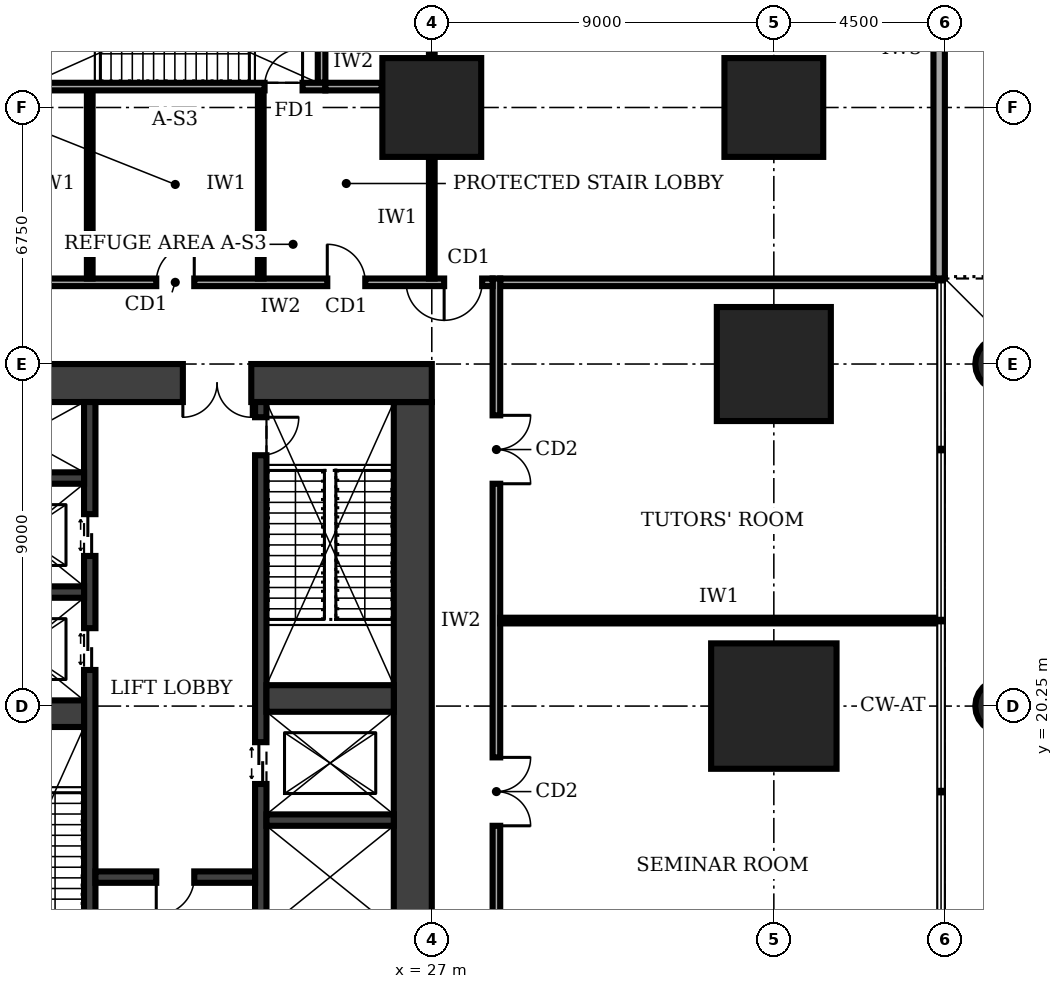
"""IFC4 building model, lengths in metres.
Left out: names, types, materials, properties, quantities, classifications, styles, units other than length and angle.
Written with IfcOpenShell. Run it as: python <this file> out.ifc"""

import sys

from ifc_helpers import new_model, si_unit, direction, frame, frame_2d, origin, origin_2d, place, context, subcontext, project, spatial, rectangle, circle, extrude, element, fill, save


model = new_model("IFC4")
c1 = context("Model", 3, precision=1e-05, world=origin(), true_north=direction((0.0, 1.0)))
c2 = subcontext(c1, "Body", "Model", "MODEL_VIEW")
j1 = project(units=[si_unit("LENGTHUNIT", "METRE"), si_unit("PLANEANGLEUNIT", "RADIAN")], contexts=[c1])
p1 = place(None, origin())
s1 = spatial("IfcSite", under=j1, at=p1, CompositionType="ELEMENT")
p2 = place(p1, origin())
s2 = spatial("IfcBuilding", under=s1, at=p2, CompositionType="ELEMENT")
p3 = place(p2, frame((0.0, 0.0, 6.0)))
s3 = spatial("IfcBuildingStorey", under=s2, at=p3, CompositionType="ELEMENT", Elevation=6.0)
p4 = place(p3, frame((26.5, 12.25, 0.0), z_axis=(0.0, 0.0, 1.0), x_axis=(0.0, 1.0, 0.0)))
e1 = element("IfcWall", 1, at=p4, inside=s3, PredefinedType="SHEAR", context=c2, shape_type="SweptSolid", body=[
    extrude(rectangle(XDim=16.0, YDim=1.0, at=frame_2d((8.0, 0.0))), origin(), (0.0, 0.0, 1.0), 5.0),
])
p5 = place(p3, frame((27.0, 28.75, 0.0), z_axis=(0.0, 0.0, 1.0), x_axis=(-1.0, 0.0, 0.0)))
e2 = element("IfcWall", 2, at=p5, inside=s3, PredefinedType="SHEAR", context=c2, shape_type="SweptSolid", body=[
    extrude(rectangle(XDim=13.5, YDim=1.0, at=frame_2d((6.75, 0.0))), origin(), (0.0, 0.0, 1.0), 5.0),
])
p6 = place(p5, frame((4.75, 0.0, 0.0)))
e3 = element("IfcOpeningElement", 3, at=p6, cuts=e2, PredefinedType="OPENING", context=c2, shape_type="SweptSolid", body=[
    extrude(rectangle(XDim=1.8, YDim=2.1, at=frame_2d((0.9, 1.05))), frame((0.0, 0.51, 0.0), z_axis=(0.0, -1.0, 0.0), x_axis=(1.0, 0.0, 0.0)), (0.0, 0.0, 1.0), 1.02),
])
p7 = place(p3, frame((18.0, 12.25, 0.0), z_axis=(0.0, 0.0, 1.0), x_axis=(0.0, 1.0, 0.0)))
e4 = element("IfcWall", 4, at=p7, inside=s3, PredefinedType="SHEAR", context=c2, shape_type="SweptSolid", body=[
    extrude(rectangle(XDim=16.0, YDim=0.3, at=frame_2d((8.0, 0.0))), origin(), (0.0, 0.0, 1.0), 5.0),
])
p8 = place(p7, frame((0.4, 0.0, 0.0)))
e5 = element("IfcOpeningElement", 5, at=p8, cuts=e4, PredefinedType="OPENING", context=c2, shape_type="SweptSolid", body=[
    extrude(rectangle(XDim=1.0, YDim=2.1, at=frame_2d((0.5, 1.05))), frame((0.0, 0.16, 0.0), z_axis=(0.0, -1.0, 0.0), x_axis=(1.0, 0.0, 0.0)), (0.0, 0.0, 1.0), 0.32),
])
p9 = place(p7, frame((8.95, 0.0, 0.0)))
e6 = element("IfcOpeningElement", 6, at=p9, cuts=e4, PredefinedType="OPENING", context=c2, shape_type="SweptSolid", body=[
    extrude(rectangle(XDim=1.1, YDim=2.1, at=frame_2d((0.55, 1.05))), frame((0.0, 0.16, 0.0), z_axis=(0.0, -1.0, 0.0), x_axis=(1.0, 0.0, 0.0)), (0.0, 0.0, 1.0), 0.32),
])
p10 = place(p7, frame((11.95, 0.0, 0.0)))
e7 = element("IfcOpeningElement", 7, at=p10, cuts=e4, PredefinedType="OPENING", context=c2, shape_type="SweptSolid", body=[
    extrude(rectangle(XDim=1.1, YDim=2.1, at=frame_2d((0.55, 1.05))), frame((0.0, 0.16, 0.0), z_axis=(0.0, -1.0, 0.0), x_axis=(1.0, 0.0, 0.0)), (0.0, 0.0, 1.0), 0.32),
])
p11 = place(p3, frame((22.5, 12.25, 0.0), z_axis=(0.0, 0.0, 1.0), x_axis=(0.0, 1.0, 0.0)))
e8 = element("IfcWall", 8, at=p11, inside=s3, PredefinedType="SHEAR", context=c2, shape_type="SweptSolid", body=[
    extrude(rectangle(XDim=16.0, YDim=0.3, at=frame_2d((8.0, 0.0))), origin(), (0.0, 0.0, 1.0), 5.0),
])
p12 = place(p11, frame((14.6, 0.0, 0.0)))
e9 = element("IfcOpeningElement", 9, at=p12, cuts=e8, PredefinedType="OPENING", context=c2, shape_type="SweptSolid", body=[
    extrude(rectangle(XDim=1.0, YDim=2.1, at=frame_2d((0.5, 1.05))), frame((0.0, 0.16, 0.0), z_axis=(0.0, -1.0, 0.0), x_axis=(1.0, 0.0, 0.0)), (0.0, 0.0, 1.0), 0.32),
])
p13 = place(p11, frame((0.375, 0.0, 0.0)))
e10 = element("IfcOpeningElement", 10, at=p13, cuts=e8, PredefinedType="OPENING", context=c2, shape_type="SweptSolid", body=[
    extrude(rectangle(XDim=1.1, YDim=2.1, at=frame_2d((0.55, 1.05))), frame((0.0, 0.16, 0.0), z_axis=(0.0, -1.0, 0.0), x_axis=(1.0, 0.0, 0.0)), (0.0, 0.0, 1.0), 0.32),
])
p14 = place(p11, frame((5.95, 0.0, 0.0)))
e11 = element("IfcOpeningElement", 11, at=p14, cuts=e8, PredefinedType="OPENING", context=c2, shape_type="SweptSolid", body=[
    extrude(rectangle(XDim=1.1, YDim=2.1, at=frame_2d((0.55, 1.05))), frame((0.0, 0.16, 0.0), z_axis=(0.0, -1.0, 0.0), x_axis=(1.0, 0.0, 0.0)), (0.0, 0.0, 1.0), 0.32),
])
p15 = place(p3, frame((14.5, 20.05, 0.0), z_axis=(0.0, 0.0, 1.0), x_axis=(1.0, 0.0, 0.0)))
e12 = element("IfcWall", 12, at=p15, inside=s3, PredefinedType="SHEAR", context=c2, shape_type="SweptSolid", body=[
    extrude(rectangle(XDim=3.35, YDim=0.7, at=frame_2d((1.675, 0.0))), origin(), (0.0, 0.0, 1.0), 5.0),
])
p16 = place(p3, frame((18.15, 15.75, 0.0), z_axis=(0.0, 0.0, 1.0), x_axis=(1.0, 0.0, 0.0)))
e13 = element("IfcWall", 13, at=p16, inside=s3, PredefinedType="SHEAR", context=c2, shape_type="SweptSolid", body=[
    extrude(rectangle(XDim=4.2, YDim=0.3, at=frame_2d((2.1, 0.0))), origin(), (0.0, 0.0, 1.0), 5.0),
])
p17 = place(p16, frame((1.6, 0.0, 0.0)))
e14 = element("IfcOpeningElement", 14, at=p17, cuts=e13, PredefinedType="OPENING", context=c2, shape_type="SweptSolid", body=[
    extrude(rectangle(XDim=1.0, YDim=2.1, at=frame_2d((0.5, 1.05))), frame((0.0, 0.16, 0.0), z_axis=(0.0, -1.0, 0.0), x_axis=(1.0, 0.0, 0.0)), (0.0, 0.0, 1.0), 0.32),
])
p18 = place(p3, frame((22.65, 17.25, 0.0), z_axis=(0.0, 0.0, 1.0), x_axis=(1.0, 0.0, 0.0)))
e15 = element("IfcWall", 15, at=p18, inside=s3, PredefinedType="SHEAR", context=c2, shape_type="SweptSolid", body=[
    extrude(rectangle(XDim=3.35, YDim=0.3, at=frame_2d((1.675, 0.0))), origin(), (0.0, 0.0, 1.0), 5.0),
])
p19 = place(p3, frame((22.65, 20.45, 0.0), z_axis=(0.0, 0.0, 1.0), x_axis=(1.0, 0.0, 0.0)))
e16 = element("IfcWall", 16, at=p19, inside=s3, PredefinedType="SHEAR", context=c2, shape_type="SweptSolid", body=[
    extrude(rectangle(XDim=3.35, YDim=0.7, at=frame_2d((1.675, 0.0))), origin(), (0.0, 0.0, 1.0), 5.0),
])
for number, where, z_axis, x_axis in (
    (17, (14.5, 23.25, 0.0), (0.0, 0.0, 1.0), (1.0, 0.0, 0.0)),
    (18, (14.5, 26.25, 0.0), (0.0, 0.0, 1.0), (1.0, 0.0, 0.0)),
):
    element("IfcWall", number, at=place(p3, frame(where, z_axis=z_axis, x_axis=x_axis)), inside=s3, PredefinedType="SHEAR", context=c2, shape_type="SweptSolid", body=[
        extrude(rectangle(XDim=3.35, YDim=0.3, at=frame_2d((1.675, 0.0))), origin(), (0.0, 0.0, 1.0), 5.0),
    ])
p20 = place(p3, frame((36.0, 20.25, 0.0), z_axis=(0.0, 0.0, 1.0), x_axis=(1.0, 0.0, 0.0)))
e19 = element("IfcColumn", 19, at=p20, inside=s3, PredefinedType="COLUMN", context=c2, shape_type="SweptSolid", body=[
    extrude(rectangle(XDim=3.3, YDim=3.3, at=origin_2d()), origin(), (0.0, 0.0, 1.0), 5.0),
])
p21 = place(p3, frame((36.0, 29.25, 0.0), z_axis=(0.0, 0.0, 1.0), x_axis=(1.0, 0.0, 0.0)))
e20 = element("IfcColumn", 20, at=p21, inside=s3, PredefinedType="COLUMN", context=c2, shape_type="SweptSolid", body=[
    extrude(rectangle(XDim=3.0, YDim=3.0, at=origin_2d()), origin(), (0.0, 0.0, 1.0), 5.0),
])
for number, where, z_axis, x_axis in (
    (21, (27.0, 36.0, 0.0), (0.0, 0.0, 1.0), (1.0, 0.0, 0.0)),
    (22, (36.0, 36.0, 0.0), (0.0, 0.0, 1.0), (1.0, 0.0, 0.0)),
):
    element("IfcColumn", number, at=place(p3, frame(where, z_axis=z_axis, x_axis=x_axis)), inside=s3, PredefinedType="COLUMN", context=c2, shape_type="SweptSolid", body=[
        extrude(rectangle(XDim=2.6, YDim=2.6, at=origin_2d()), origin(), (0.0, 0.0, 1.0), 5.0),
    ])
for number, where, z_axis, x_axis in (
    (23, (42.0, 20.25, 0.0), (0.0, 0.0, 1.0), (1.0, 0.0, 0.0)),
    (24, (42.0, 29.25, 0.0), (0.0, 0.0, 1.0), (1.0, 0.0, 0.0)),
):
    element("IfcColumn", number, at=place(p3, frame(where, z_axis=z_axis, x_axis=x_axis)), inside=s3, PredefinedType="COLUMN", context=c2, shape_type="SweptSolid", body=[
        extrude(circle(Radius=0.7, at=origin_2d()), origin(), (0.0, 0.0, 1.0), 5.0),
    ])
p22 = place(p3, frame((28.7, 9.2, 0.0), z_axis=(0.0, 0.0, 1.0), x_axis=(0.0, 1.0, 0.0)))
e25 = element("IfcWall", 25, at=p22, inside=s3, PredefinedType="SOLIDWALL", context=c2, shape_type="SweptSolid", body=[
    extrude(rectangle(XDim=22.3, YDim=0.2, at=frame_2d((11.15, 0.0))), origin(), (0.0, 0.0, 1.0), 4.7),
])
p23 = place(p22, frame((1.55, 0.0, 0.0)))
e26 = element("IfcOpeningElement", 26, at=p23, cuts=e25, PredefinedType="OPENING", context=c2, shape_type="SweptSolid", body=[
    extrude(rectangle(XDim=1.0, YDim=2.1, at=frame_2d((0.5, 1.05))), frame((0.0, 0.11, 0.0), z_axis=(0.0, -1.0, 0.0), x_axis=(1.0, 0.0, 0.0)), (0.0, 0.0, 1.0), 0.22),
])
p24 = place(p22, frame((7.9, 0.0, 0.0)))
e27 = element("IfcOpeningElement", 27, at=p24, cuts=e25, PredefinedType="OPENING", context=c2, shape_type="SweptSolid", body=[
    extrude(rectangle(XDim=1.8, YDim=2.1, at=frame_2d((0.9, 1.05))), frame((0.0, 0.11, 0.0), z_axis=(0.0, -1.0, 0.0), x_axis=(1.0, 0.0, 0.0)), (0.0, 0.0, 1.0), 0.22),
])
p25 = place(p22, frame((16.9, 0.0, 0.0)))
e28 = element("IfcOpeningElement", 28, at=p25, cuts=e25, PredefinedType="OPENING", context=c2, shape_type="SweptSolid", body=[
    extrude(rectangle(XDim=1.8, YDim=2.1, at=frame_2d((0.9, 1.05))), frame((0.0, 0.11, 0.0), z_axis=(0.0, -1.0, 0.0), x_axis=(1.0, 0.0, 0.0)), (0.0, 0.0, 1.0), 0.22),
])
p26 = place(p3, frame((28.6, 31.4, 0.0), z_axis=(0.0, 0.0, 1.0), x_axis=(-1.0, 0.0, 0.0)))
e29 = element("IfcWall", 29, at=p26, inside=s3, PredefinedType="SOLIDWALL", context=c2, shape_type="SweptSolid", body=[
    extrude(rectangle(XDim=16.9, YDim=0.2, at=frame_2d((8.45, 0.0))), origin(), (0.0, 0.0, 1.0), 4.7),
])
p27 = place(p26, frame((15.4, 0.0, 0.0)))
e30 = element("IfcOpeningElement", 30, at=p27, cuts=e29, PredefinedType="OPENING", context=c2, shape_type="SweptSolid", body=[
    extrude(rectangle(XDim=1.2, YDim=2.4, at=frame_2d((0.6, 1.2))), frame((0.0, 0.11, 0.0), z_axis=(0.0, -1.0, 0.0), x_axis=(1.0, 0.0, 0.0)), (0.0, 0.0, 1.0), 0.22),
])
p28 = place(p26, frame((12.35, 0.0, 0.0)))
e31 = element("IfcOpeningElement", 31, at=p28, cuts=e29, PredefinedType="OPENING", context=c2, shape_type="SweptSolid", body=[
    extrude(rectangle(XDim=1.0, YDim=2.1, at=frame_2d((0.5, 1.05))), frame((0.0, 0.11, 0.0), z_axis=(0.0, -1.0, 0.0), x_axis=(1.0, 0.0, 0.0)), (0.0, 0.0, 1.0), 0.22),
])
p29 = place(p26, frame((7.85, 0.0, 0.0)))
e32 = element("IfcOpeningElement", 32, at=p29, cuts=e29, PredefinedType="OPENING", context=c2, shape_type="SweptSolid", body=[
    extrude(rectangle(XDim=1.0, YDim=2.1, at=frame_2d((0.5, 1.05))), frame((0.0, 0.11, 0.0), z_axis=(0.0, -1.0, 0.0), x_axis=(1.0, 0.0, 0.0)), (0.0, 0.0, 1.0), 0.22),
])
p30 = place(p26, frame((0.275, 0.0, 0.0)))
e33 = element("IfcOpeningElement", 33, at=p30, cuts=e29, PredefinedType="OPENING", context=c2, shape_type="SweptSolid", body=[
    extrude(rectangle(XDim=1.0, YDim=2.1, at=frame_2d((0.5, 1.05))), frame((0.0, 0.11, 0.0), z_axis=(0.0, -1.0, 0.0), x_axis=(1.0, 0.0, 0.0)), (0.0, 0.0, 1.0), 0.22),
])
p31 = place(p26, frame((3.35, 0.0, 0.0)))
e34 = element("IfcOpeningElement", 34, at=p31, cuts=e29, PredefinedType="OPENING", context=c2, shape_type="SweptSolid", body=[
    extrude(rectangle(XDim=1.0, YDim=2.1, at=frame_2d((0.5, 1.05))), frame((0.0, 0.11, 0.0), z_axis=(0.0, -1.0, 0.0), x_axis=(1.0, 0.0, 0.0)), (0.0, 0.0, 1.0), 0.22),
])
p32 = place(p3, frame((28.8, 31.4, 0.0), z_axis=(0.0, 0.0, 1.0), x_axis=(1.0, 0.0, 0.0)))
e35 = element("IfcWall", 35, at=p32, inside=s3, PredefinedType="SOLIDWALL", context=c2, shape_type="SweptSolid", body=[
    extrude(rectangle(XDim=11.52, YDim=0.2, at=frame_2d((5.76, 0.0))), origin(), (0.0, 0.0, 1.0), 4.7),
])
for number, where, z_axis, x_axis in (
    (36, (18.0, 31.5, 0.0), (0.0, 0.0, 1.0), (0.0, 1.0, 0.0)),
    (37, (22.5, 31.5, 0.0), (0.0, 0.0, 1.0), (0.0, 1.0, 0.0)),
):
    element("IfcWall", number, at=place(p3, frame(where, z_axis=z_axis, x_axis=x_axis)), inside=s3, PredefinedType="PARTITIONING", context=c2, shape_type="SweptSolid", body=[
        extrude(rectangle(XDim=4.95, YDim=0.15, at=frame_2d((2.475, 0.0))), origin(), (0.0, 0.0, 1.0), 4.7),
    ])
p33 = place(p3, frame((27.0, 31.5, 0.0), z_axis=(0.0, 0.0, 1.0), x_axis=(0.0, 1.0, 0.0)))
e38 = element("IfcWall", 38, at=p33, inside=s3, PredefinedType="PARTITIONING", context=c2, shape_type="SweptSolid", body=[
    extrude(rectangle(XDim=3.18, YDim=0.15, at=frame_2d((1.59, 0.0))), origin(), (0.0, 0.0, 1.0), 3.8),
])
p34 = place(p3, frame((27.0, 37.32, 0.0), z_axis=(0.0, 0.0, 1.0), x_axis=(0.0, 1.0, 0.0)))
e39 = element("IfcWall", 39, at=p34, inside=s3, PredefinedType="PARTITIONING", context=c2, shape_type="SweptSolid", body=[
    extrude(rectangle(XDim=4.21, YDim=0.15, at=frame_2d((2.105, 0.0))), origin(), (0.0, 0.0, 1.0), 3.7),
])
p35 = place(p34, frame((2.5, 0.0, 0.0)))
e40 = element("IfcOpeningElement", 40, at=p35, cuts=e39, PredefinedType="OPENING", context=c2, shape_type="SweptSolid", body=[
    extrude(rectangle(XDim=1.0, YDim=2.1, at=frame_2d((0.5, 1.05))), frame((0.0, 0.085, 0.0), z_axis=(0.0, -1.0, 0.0), x_axis=(1.0, 0.0, 0.0)), (0.0, 0.0, 1.0), 0.17),
])
p36 = place(p3, frame((28.8, 22.5, 0.0), z_axis=(0.0, 0.0, 1.0), x_axis=(1.0, 0.0, 0.0)))
e41 = element("IfcWall", 41, at=p36, inside=s3, PredefinedType="PARTITIONING", context=c2, shape_type="SweptSolid", body=[
    extrude(rectangle(XDim=11.52, YDim=0.15, at=frame_2d((5.76, 0.0))), origin(), (0.0, 0.0, 1.0), 4.7),
])
p37 = place(p3, frame((24.2, 36.55, 0.0), z_axis=(0.0, 0.0, 1.0), x_axis=(1.0, 0.0, 0.0)))
e42 = element("IfcWall", 42, at=p37, inside=s3, PredefinedType="SOLIDWALL", context=c2, shape_type="SweptSolid", body=[
    extrude(rectangle(XDim=1.48, YDim=0.2, at=frame_2d((0.74, 0.0))), origin(), (0.0, 0.0, 1.0), 4.7),
])
p38 = place(p3, frame((16.3, 36.55, 0.0), z_axis=(0.0, 0.0, 1.0), x_axis=(1.0, 0.0, 0.0)))
e43 = element("IfcWall", 43, at=p38, inside=s3, PredefinedType="SOLIDWALL", context=c2, shape_type="SweptSolid", body=[
    extrude(rectangle(XDim=7.9, YDim=0.2, at=frame_2d((3.95, 0.0))), origin(), (0.0, 0.0, 1.0), 4.7),
])
p39 = place(p38, frame((6.3, 0.0, 0.0)))
e44 = element("IfcOpeningElement", 44, at=p39, cuts=e43, PredefinedType="OPENING", context=c2, shape_type="SweptSolid", body=[
    extrude(rectangle(XDim=1.0, YDim=2.1, at=frame_2d((0.5, 1.05))), frame((0.0, 0.11, 0.0), z_axis=(0.0, -1.0, 0.0), x_axis=(1.0, 0.0, 0.0)), (0.0, 0.0, 1.0), 0.22),
])
p40 = place(p3, frame((24.1, 36.65, 0.0), z_axis=(0.0, 0.0, 1.0), x_axis=(0.0, 1.0, 0.0)))
e45 = element("IfcWall", 45, at=p40, inside=s3, PredefinedType="SOLIDWALL", context=c2, shape_type="SweptSolid", body=[
    extrude(rectangle(XDim=3.35, YDim=0.2, at=frame_2d((1.675, 0.0))), origin(), (0.0, 0.0, 1.0), 4.7),
])
p41 = place(p3, frame((40.35, 31.5, 0.0), z_axis=(0.0, 0.0, 1.0), x_axis=(0.0, 1.0, 0.0)))
e46 = element("IfcWall", 46, at=p41, inside=s3, PredefinedType="SOLIDWALL", context=c2, shape_type="SweptSolid", body=[
    extrude(rectangle(XDim=16.63, YDim=0.3, at=frame_2d((8.315, 0.0))), origin(), (0.0, 0.0, 1.0), 4.7),
])
p42 = place(p41, frame((12.1, 0.0, 0.0)))
e47 = element("IfcOpeningElement", 47, at=p42, cuts=e46, PredefinedType="OPENING", context=c2, shape_type="SweptSolid", body=[
    extrude(rectangle(XDim=1.8, YDim=2.1, at=frame_2d((0.9, 1.05))), frame((0.0, 0.16, 0.0), z_axis=(0.0, -1.0, 0.0), x_axis=(1.0, 0.0, 0.0)), (0.0, 0.0, 1.0), 0.32),
])
p43 = place(p6, origin())
e48 = element("IfcDoor", 48, at=p43, inside=s3, OperationType="DOUBLE_DOOR_SINGLE_SWING", PredefinedType="DOOR", context=c2, shape_type="SweptSolid", body=[
    extrude(rectangle(XDim=1.8, YDim=2.1, at=frame_2d((0.9, 1.05))), frame((0.0, 0.025, 0.0), z_axis=(0.0, -1.0, 0.0), x_axis=(1.0, 0.0, 0.0)), (0.0, 0.0, 1.0), 0.05),
])
fill(e3, e48)
p44 = place(p17, frame((1.0, 0.0, 0.0), z_axis=(0.0, 0.0, 1.0), x_axis=(-1.0, 0.0, 0.0)))
e49 = element("IfcDoor", 49, at=p44, inside=s3, OperationType="SINGLE_SWING_RIGHT", PredefinedType="DOOR", context=c2, shape_type="SweptSolid", body=[
    extrude(rectangle(XDim=1.0, YDim=2.1, at=frame_2d((0.5, 1.05))), frame((0.0, 0.025, 0.0), z_axis=(0.0, -1.0, 0.0), x_axis=(1.0, 0.0, 0.0)), (0.0, 0.0, 1.0), 0.05),
])
fill(e14, e49)
p45 = place(p12, frame((1.0, 0.0, 0.0), z_axis=(0.0, 0.0, 1.0), x_axis=(-1.0, 0.0, 0.0)))
e50 = element("IfcDoor", 50, at=p45, inside=s3, OperationType="SINGLE_SWING_LEFT", PredefinedType="DOOR", context=c2, shape_type="SweptSolid", body=[
    extrude(rectangle(XDim=1.0, YDim=2.1, at=frame_2d((0.5, 1.05))), frame((0.0, 0.025, 0.0), z_axis=(0.0, -1.0, 0.0), x_axis=(1.0, 0.0, 0.0)), (0.0, 0.0, 1.0), 0.05),
])
fill(e9, e50)
p46 = place(p9, origin())
e51 = element("IfcDoor", 51, at=p46, inside=s3, OperationType="DOUBLE_DOOR_SLIDING", PredefinedType="DOOR", context=c2, shape_type="SweptSolid", body=[
    extrude(rectangle(XDim=1.1, YDim=2.1, at=frame_2d((0.55, 1.05))), frame((0.0, 0.025, 0.0), z_axis=(0.0, -1.0, 0.0), x_axis=(1.0, 0.0, 0.0)), (0.0, 0.0, 1.0), 0.05),
])
fill(e6, e51)
p47 = place(p10, origin())
e52 = element("IfcDoor", 52, at=p47, inside=s3, OperationType="DOUBLE_DOOR_SLIDING", PredefinedType="DOOR", context=c2, shape_type="SweptSolid", body=[
    extrude(rectangle(XDim=1.1, YDim=2.1, at=frame_2d((0.55, 1.05))), frame((0.0, 0.025, 0.0), z_axis=(0.0, -1.0, 0.0), x_axis=(1.0, 0.0, 0.0)), (0.0, 0.0, 1.0), 0.05),
])
fill(e7, e52)
p48 = place(p14, origin())
e53 = element("IfcDoor", 53, at=p48, inside=s3, OperationType="DOUBLE_DOOR_SLIDING", PredefinedType="DOOR", context=c2, shape_type="SweptSolid", body=[
    extrude(rectangle(XDim=1.1, YDim=2.1, at=frame_2d((0.55, 1.05))), frame((0.0, 0.025, 0.0), z_axis=(0.0, -1.0, 0.0), x_axis=(1.0, 0.0, 0.0)), (0.0, 0.0, 1.0), 0.05),
])
fill(e11, e53)
p49 = place(p24, frame((1.8, 0.0, 0.0), z_axis=(0.0, 0.0, 1.0), x_axis=(-1.0, 0.0, 0.0)))
e54 = element("IfcDoor", 54, at=p49, inside=s3, OperationType="DOUBLE_DOOR_SINGLE_SWING", PredefinedType="DOOR", context=c2, shape_type="SweptSolid", body=[
    extrude(rectangle(XDim=1.8, YDim=2.1, at=frame_2d((0.9, 1.05))), frame((0.0, 0.025, 0.0), z_axis=(0.0, -1.0, 0.0), x_axis=(1.0, 0.0, 0.0)), (0.0, 0.0, 1.0), 0.05),
])
fill(e27, e54)
p50 = place(p25, frame((1.8, 0.0, 0.0), z_axis=(0.0, 0.0, 1.0), x_axis=(-1.0, 0.0, 0.0)))
e55 = element("IfcDoor", 55, at=p50, inside=s3, OperationType="DOUBLE_DOOR_SINGLE_SWING", PredefinedType="DOOR", context=c2, shape_type="SweptSolid", body=[
    extrude(rectangle(XDim=1.8, YDim=2.1, at=frame_2d((0.9, 1.05))), frame((0.0, 0.025, 0.0), z_axis=(0.0, -1.0, 0.0), x_axis=(1.0, 0.0, 0.0)), (0.0, 0.0, 1.0), 0.05),
])
fill(e28, e55)
p51 = place(p29, frame((1.0, 0.0, 0.0), z_axis=(0.0, 0.0, 1.0), x_axis=(-1.0, 0.0, 0.0)))
e56 = element("IfcDoor", 56, at=p51, inside=s3, OperationType="SINGLE_SWING_RIGHT", PredefinedType="DOOR", context=c2, shape_type="SweptSolid", body=[
    extrude(rectangle(XDim=1.0, YDim=2.1, at=frame_2d((0.5, 1.05))), frame((0.0, 0.025, 0.0), z_axis=(0.0, -1.0, 0.0), x_axis=(1.0, 0.0, 0.0)), (0.0, 0.0, 1.0), 0.05),
])
fill(e32, e56)
p52 = place(p30, origin())
e57 = element("IfcDoor", 57, at=p52, inside=s3, OperationType="SINGLE_SWING_RIGHT", PredefinedType="DOOR", context=c2, shape_type="SweptSolid", body=[
    extrude(rectangle(XDim=1.0, YDim=2.1, at=frame_2d((0.5, 1.05))), frame((0.0, 0.025, 0.0), z_axis=(0.0, -1.0, 0.0), x_axis=(1.0, 0.0, 0.0)), (0.0, 0.0, 1.0), 0.05),
])
fill(e33, e57)
p53 = place(p31, frame((1.0, 0.0, 0.0), z_axis=(0.0, 0.0, 1.0), x_axis=(-1.0, 0.0, 0.0)))
e58 = element("IfcDoor", 58, at=p53, inside=s3, OperationType="SINGLE_SWING_LEFT", PredefinedType="DOOR", context=c2, shape_type="SweptSolid", body=[
    extrude(rectangle(XDim=1.0, YDim=2.1, at=frame_2d((0.5, 1.05))), frame((0.0, 0.025, 0.0), z_axis=(0.0, -1.0, 0.0), x_axis=(1.0, 0.0, 0.0)), (0.0, 0.0, 1.0), 0.05),
])
fill(e34, e58)
p54 = place(p39, origin())
e59 = element("IfcDoor", 59, at=p54, inside=s3, OperationType="SINGLE_SWING_RIGHT", PredefinedType="DOOR", context=c2, shape_type="SweptSolid", body=[
    extrude(rectangle(XDim=1.0, YDim=2.1, at=frame_2d((0.5, 1.05))), frame((0.0, 0.025, 0.0), z_axis=(0.0, -1.0, 0.0), x_axis=(1.0, 0.0, 0.0)), (0.0, 0.0, 1.0), 0.05),
])
fill(e44, e59)
save(model, sys.argv[1])
